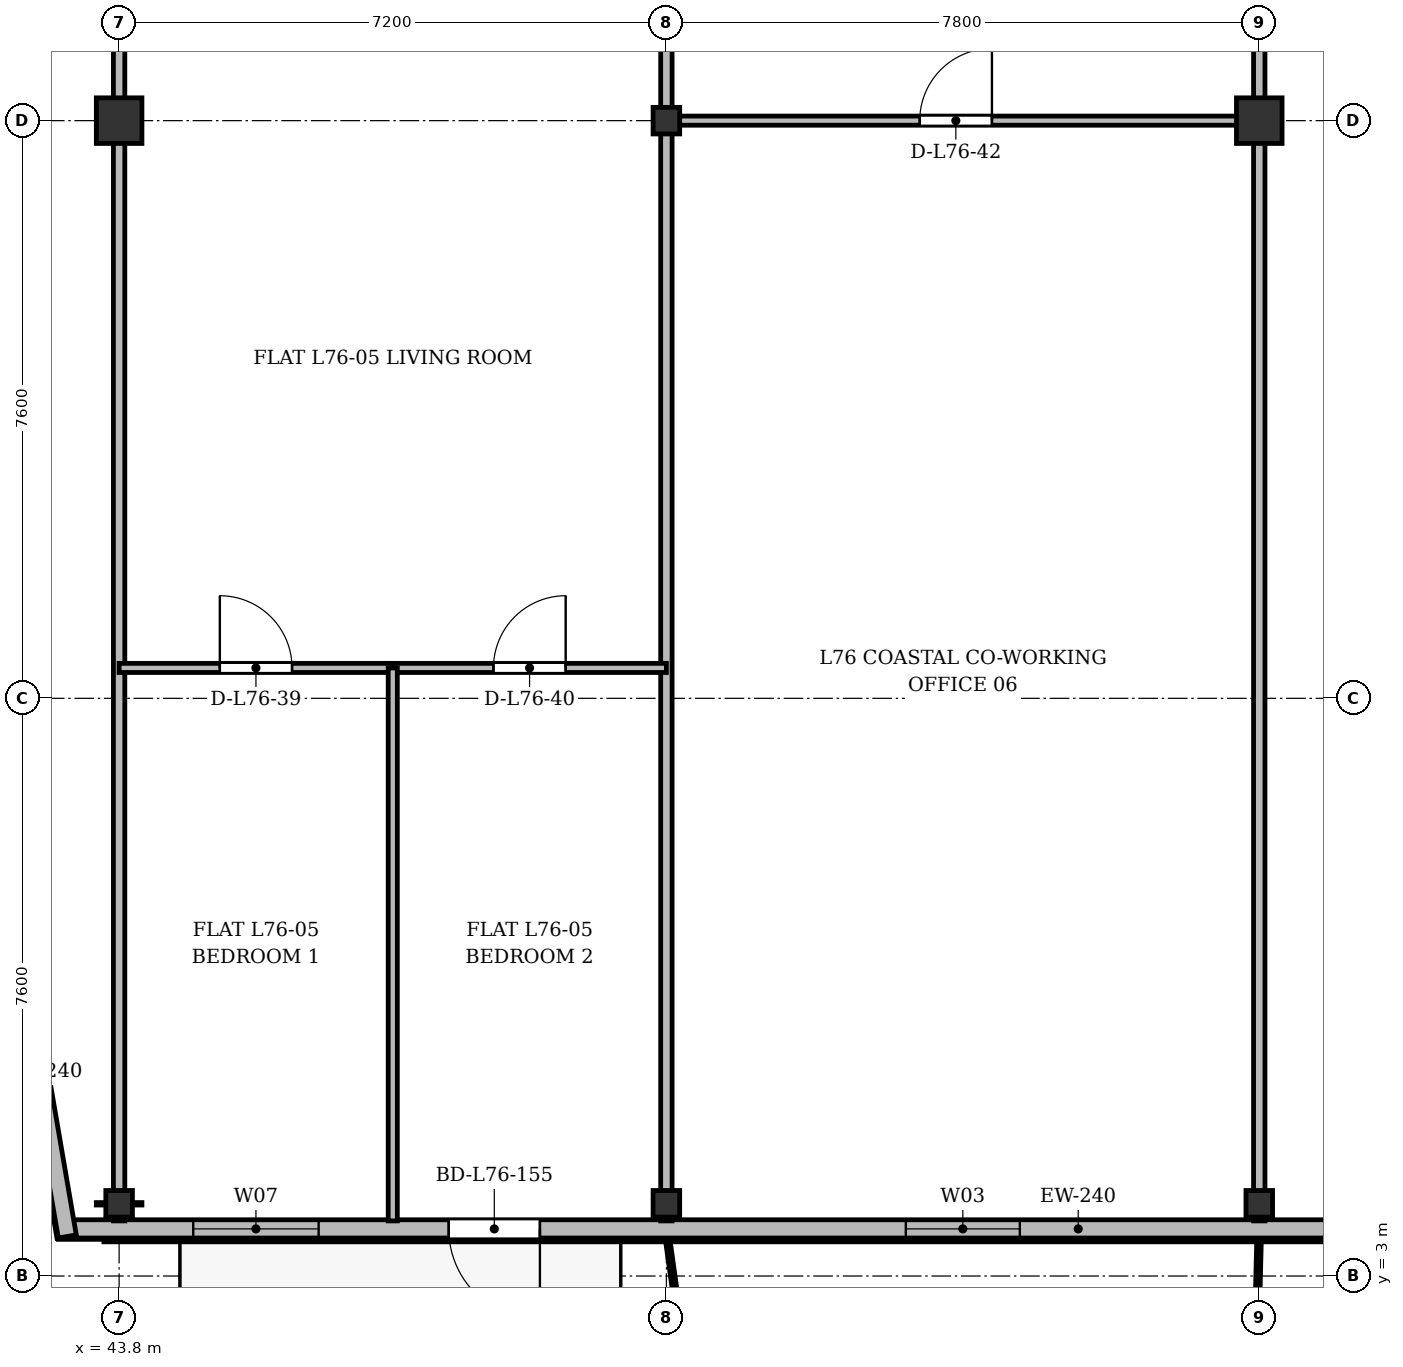
"""IFC4 building model, lengths in metres.
Left out: names, types, materials, properties, quantities, classifications, styles, units other than length and angle.
Written with IfcOpenShell. Run it as: python <this file> out.ifc"""

import sys

from ifc_helpers import new_model, si_unit, direction, frame, frame_2d, origin, origin_2d, place, context, subcontext, project, spatial, rectangle, i_section, extrude, source, transform, mapped, element, fill, save


model = new_model("IFC4")
c1 = context("Model", 3, precision=1e-05, world=origin(), true_north=direction((0.0, 1.0)))
c2 = subcontext(c1, "Body", "Model", "MODEL_VIEW")
j1 = project(units=[si_unit("LENGTHUNIT", "METRE"), si_unit("PLANEANGLEUNIT", "RADIAN")], contexts=[c1])
p1 = place(None, origin())
s1 = spatial("IfcSite", under=j1, at=p1, CompositionType="ELEMENT")
p2 = place(p1, origin())
s2 = spatial("IfcBuilding", under=s1, at=p2, CompositionType="ELEMENT")
p3 = place(p2, frame((0.0, 0.0, 291.9)))
s3 = spatial("IfcBuildingStorey", under=s2, at=p3, CompositionType="ELEMENT", Elevation=291.9)
m1 = source(origin(), c2, "Body", "SweptSolid", [
    extrude(i_section(OverallWidth=0.35, OverallDepth=0.35, WebThickness=0.018, FlangeThickness=0.028, at=origin_2d()), origin(), (0.0, 0.0, 1.0), 3.6),
])
p4 = place(p3, frame((43.8, 3.95, 0.0), z_axis=(0.0, 0.0, 1.0), x_axis=(1.0, 0.0, 0.0)))
e1 = element("IfcColumn", 1, at=p4, inside=s3, PredefinedType="COLUMN", context=c2, shape_type="MappedRepresentation", body=[
    mapped(m1, transform((0.0, 0.0, 0.0), x_axis=(1.0, 0.0, 0.0), y_axis=(0.0, 1.0, 0.0), z_axis=(0.0, 0.0, 1.0), scale=1.0)),
])
m2 = source(origin(), c2, "Body", "SweptSolid", [
    extrude(rectangle(XDim=0.6, YDim=0.6, at=origin_2d()), origin(), (0.0, 0.0, 1.0), 3.6),
])
p5 = place(p3, frame((43.8, 18.2, 0.0), z_axis=(0.0, 0.0, 1.0), x_axis=(1.0, 0.0, 0.0)))
e2 = element("IfcColumn", 2, at=p5, inside=s3, PredefinedType="COLUMN", context=c2, shape_type="MappedRepresentation", body=[
    mapped(m2, transform((0.0, 0.0, 0.0), x_axis=(1.0, 0.0, 0.0), y_axis=(0.0, 1.0, 0.0), z_axis=(0.0, 0.0, 1.0), scale=1.0)),
])
for number, where, z_axis, x_axis in (
    (3, (51.0, 3.95, 0.0), (0.0, 0.0, 1.0), (1.0, 0.0, 0.0)),
    (4, (51.0, 18.2, 0.0), (0.0, 0.0, 1.0), (1.0, 0.0, 0.0)),
    (5, (58.8, 3.95, 0.0), (0.0, 0.0, 1.0), (1.0, 0.0, 0.0)),
):
    element("IfcColumn", number, at=place(p3, frame(where, z_axis=z_axis, x_axis=x_axis)), inside=s3, PredefinedType="COLUMN", context=c2, shape_type="MappedRepresentation", body=[
        mapped(m1, transform((0.0, 0.0, 0.0), x_axis=(1.0, 0.0, 0.0), y_axis=(0.0, 1.0, 0.0), z_axis=(0.0, 0.0, 1.0), scale=1.0)),
    ])
p6 = place(p3, frame((58.8, 18.2, 0.0), z_axis=(0.0, 0.0, 1.0), x_axis=(1.0, 0.0, 0.0)))
e6 = element("IfcColumn", 6, at=p6, inside=s3, PredefinedType="COLUMN", context=c2, shape_type="MappedRepresentation", body=[
    mapped(m2, transform((0.0, 0.0, 0.0), x_axis=(1.0, 0.0, 0.0), y_axis=(0.0, 1.0, 0.0), z_axis=(0.0, 0.0, 1.0), scale=1.0)),
])
p7 = place(p3, frame((63.2, 3.62, 0.0), z_axis=(0.0, 0.0, 1.0), x_axis=(-1.0, 0.0, 0.0)))
e7 = element("IfcWall", 7, at=p7, inside=s3, PredefinedType="SOLIDWALL", context=c2, shape_type="SweptSolid", body=[
    extrude(rectangle(XDim=20.2, YDim=0.24, at=frame_2d((10.1, 0.0))), origin(), (0.0, 0.0, 1.0), 3.18),
])
p8 = place(p7, frame((1.145, 0.0, 0.9)))
e8 = element("IfcOpeningElement", 8, at=p8, cuts=e7, PredefinedType="OPENING", context=c2, shape_type="SweptSolid", body=[
    extrude(rectangle(XDim=2.2, YDim=1.8, at=frame_2d((1.1, 0.9))), frame((0.0, 0.13, 0.0), z_axis=(0.0, -1.0, 0.0), x_axis=(1.0, 0.0, 0.0)), (0.0, 0.0, 1.0), 0.26),
])
p9 = place(p7, frame((7.55, 0.0, 0.9)))
e9 = element("IfcOpeningElement", 9, at=p9, cuts=e7, PredefinedType="OPENING", context=c2, shape_type="SweptSolid", body=[
    extrude(rectangle(XDim=1.5, YDim=1.75, at=frame_2d((0.75, 0.875))), frame((0.0, 0.13, 0.0), z_axis=(0.0, -1.0, 0.0), x_axis=(1.0, 0.0, 0.0)), (0.0, 0.0, 1.0), 0.26),
])
p10 = place(p7, frame((13.864, 0.0, 0.0)))
e10 = element("IfcOpeningElement", 10, at=p10, cuts=e7, PredefinedType="OPENING", context=c2, shape_type="SweptSolid", body=[
    extrude(rectangle(XDim=1.2, YDim=2.2, at=frame_2d((0.6, 1.1))), frame((0.0, 0.13, 0.0), z_axis=(0.0, -1.0, 0.0), x_axis=(1.0, 0.0, 0.0)), (0.0, 0.0, 1.0), 0.26),
])
p11 = place(p7, frame((16.775, 0.0, 0.9)))
e11 = element("IfcOpeningElement", 11, at=p11, cuts=e7, PredefinedType="OPENING", context=c2, shape_type="SweptSolid", body=[
    extrude(rectangle(XDim=1.65, YDim=1.85, at=frame_2d((0.825, 0.925))), frame((0.0, 0.13, 0.0), z_axis=(0.0, -1.0, 0.0), x_axis=(1.0, 0.0, 0.0)), (0.0, 0.0, 1.0), 0.26),
])
p12 = place(p3, frame((43.118, 3.52, 0.0), z_axis=(0.0, 0.0, 1.0), x_axis=(-0.168990530437, 0.98561767467, 0.0)))
e12 = element("IfcWall", 12, at=p12, inside=s3, PredefinedType="SOLIDWALL", context=c2, shape_type="SweptSolid", body=[
    extrude(rectangle(XDim=3.551, YDim=0.24, at=frame_2d((1.775, 0.0))), origin(), (0.0, 0.0, 1.0), 2.73),
])
for number, where, z_axis, x_axis in (
    (13, (43.8, 3.725, 0.0), (0.0, 0.0, 1.0), (0.0, 1.0, 0.0)),
    (14, (51.0, 3.725, 0.0), (0.0, 0.0, 1.0), (0.0, 1.0, 0.0)),
):
    element("IfcWall", number, at=place(p3, frame(where, z_axis=z_axis, x_axis=x_axis)), inside=s3, PredefinedType="PARTITIONING", context=c2, shape_type="SweptSolid", body=[
        extrude(rectangle(XDim=27.275, YDim=0.15, at=frame_2d((13.637, 0.0))), origin(), (0.0, 0.0, 1.0), 2.68),
    ])
p13 = place(p3, frame((58.8, 3.725, 0.0), z_axis=(0.0, 0.0, 1.0), x_axis=(0.0, 1.0, 0.0)))
e15 = element("IfcWall", 15, at=p13, inside=s3, PredefinedType="PARTITIONING", context=c2, shape_type="SweptSolid", body=[
    extrude(rectangle(XDim=27.275, YDim=0.15, at=frame_2d((13.637, 0.0))), origin(), (0.0, 0.0, 1.0), 2.53),
])
p14 = place(p3, frame((43.8, 11.0, 0.0), z_axis=(0.0, 0.0, 1.0), x_axis=(1.0, 0.0, 0.0)))
e16 = element("IfcWall", 16, at=p14, inside=s3, PredefinedType="PARTITIONING", context=c2, shape_type="SweptSolid", body=[
    extrude(rectangle(XDim=3.6, YDim=0.12, at=frame_2d((1.8, 0.0))), origin(), (0.0, 0.0, 1.0), 2.68),
])
p15 = place(p14, frame((1.325, 0.0, 0.0)))
e17 = element("IfcOpeningElement", 17, at=p15, cuts=e16, PredefinedType="OPENING", context=c2, shape_type="SweptSolid", body=[
    extrude(rectangle(XDim=0.95, YDim=2.15, at=frame_2d((0.475, 1.075))), frame((0.0, 0.07, 0.0), z_axis=(0.0, -1.0, 0.0), x_axis=(1.0, 0.0, 0.0)), (0.0, 0.0, 1.0), 0.14),
])
p16 = place(p3, frame((47.4, 11.0, 0.0), z_axis=(0.0, 0.0, 1.0), x_axis=(1.0, 0.0, 0.0)))
e18 = element("IfcWall", 18, at=p16, inside=s3, PredefinedType="PARTITIONING", context=c2, shape_type="SweptSolid", body=[
    extrude(rectangle(XDim=3.6, YDim=0.12, at=frame_2d((1.8, 0.0))), origin(), (0.0, 0.0, 1.0), 2.68),
])
p17 = place(p16, frame((1.325, 0.0, 0.0)))
e19 = element("IfcOpeningElement", 19, at=p17, cuts=e18, PredefinedType="OPENING", context=c2, shape_type="SweptSolid", body=[
    extrude(rectangle(XDim=0.95, YDim=2.15, at=frame_2d((0.475, 1.075))), frame((0.0, 0.07, 0.0), z_axis=(0.0, -1.0, 0.0), x_axis=(1.0, 0.0, 0.0)), (0.0, 0.0, 1.0), 0.14),
])
p18 = place(p3, frame((47.4, 3.725, 0.0), z_axis=(0.0, 0.0, 1.0), x_axis=(0.0, 1.0, 0.0)))
e20 = element("IfcWall", 20, at=p18, inside=s3, PredefinedType="PARTITIONING", context=c2, shape_type="SweptSolid", body=[
    extrude(rectangle(XDim=7.275, YDim=0.12, at=frame_2d((3.637, 0.0))), origin(), (0.0, 0.0, 1.0), 2.73),
])
p19 = place(p3, frame((51.0, 18.2, 0.0), z_axis=(0.0, 0.0, 1.0), x_axis=(1.0, 0.0, 0.0)))
e21 = element("IfcWall", 21, at=p19, inside=s3, PredefinedType="PARTITIONING", context=c2, shape_type="SweptSolid", body=[
    extrude(rectangle(XDim=7.8, YDim=0.12, at=frame_2d((3.9, 0.0))), origin(), (0.0, 0.0, 1.0), 2.73),
])
p20 = place(p19, frame((3.333, 0.0, 0.0)))
e22 = element("IfcOpeningElement", 22, at=p20, cuts=e21, PredefinedType="OPENING", context=c2, shape_type="SweptSolid", body=[
    extrude(rectangle(XDim=0.95, YDim=2.15, at=frame_2d((0.475, 1.075))), frame((0.0, 0.07, 0.0), z_axis=(0.0, -1.0, 0.0), x_axis=(1.0, 0.0, 0.0)), (0.0, 0.0, 1.0), 0.14),
])
m3 = source(origin(), c2, "Body", "SweptSolid", [
    extrude(rectangle(XDim=1.5, YDim=1.75, at=frame_2d((0.75, 0.875))), frame((0.0, 0.03, 0.0), z_axis=(0.0, -1.0, 0.0), x_axis=(1.0, 0.0, 0.0)), (0.0, 0.0, 1.0), 0.06),
])
p21 = place(p9, origin())
e23 = element("IfcWindow", 23, at=p21, inside=s3, PartitioningType="SINGLE_PANEL", PredefinedType="WINDOW", context=c2, shape_type="MappedRepresentation", body=[
    mapped(m3, transform((0.0, 0.0, 0.0), x_axis=(1.0, 0.0, 0.0), y_axis=(0.0, 1.0, 0.0), z_axis=(0.0, 0.0, 1.0), scale=1.0)),
])
fill(e9, e23)
m4 = source(origin(), c2, "Body", "SweptSolid", [
    extrude(rectangle(XDim=1.2, YDim=2.2, at=frame_2d((0.6, 1.1))), frame((0.0, 0.025, 0.0), z_axis=(0.0, -1.0, 0.0), x_axis=(1.0, 0.0, 0.0)), (0.0, 0.0, 1.0), 0.05),
])
p22 = place(p10, origin())
e24 = element("IfcDoor", 24, at=p22, inside=s3, OperationType="SINGLE_SWING_LEFT", PredefinedType="DOOR", context=c2, shape_type="MappedRepresentation", body=[
    mapped(m4, transform((0.0, 0.0, 0.0), x_axis=(1.0, 0.0, 0.0), y_axis=(0.0, 1.0, 0.0), z_axis=(0.0, 0.0, 1.0), scale=1.0)),
])
fill(e10, e24)
m5 = source(origin(), c2, "Body", "SweptSolid", [
    extrude(rectangle(XDim=1.65, YDim=1.85, at=frame_2d((0.825, 0.925))), frame((0.0, 0.03, 0.0), z_axis=(0.0, -1.0, 0.0), x_axis=(1.0, 0.0, 0.0)), (0.0, 0.0, 1.0), 0.06),
])
p23 = place(p11, origin())
e25 = element("IfcWindow", 25, at=p23, inside=s3, PartitioningType="SINGLE_PANEL", PredefinedType="WINDOW", context=c2, shape_type="MappedRepresentation", body=[
    mapped(m5, transform((0.0, 0.0, 0.0), x_axis=(1.0, 0.0, 0.0), y_axis=(0.0, 1.0, 0.0), z_axis=(0.0, 0.0, 1.0), scale=1.0)),
])
fill(e11, e25)
m6 = source(origin(), c2, "Body", "SweptSolid", [
    extrude(rectangle(XDim=0.95, YDim=2.15, at=frame_2d((0.475, 1.075))), frame((0.0, 0.025, 0.0), z_axis=(0.0, -1.0, 0.0), x_axis=(1.0, 0.0, 0.0)), (0.0, 0.0, 1.0), 0.05),
])
p24 = place(p15, origin())
e26 = element("IfcDoor", 26, at=p24, inside=s3, OperationType="SINGLE_SWING_LEFT", PredefinedType="DOOR", context=c2, shape_type="MappedRepresentation", body=[
    mapped(m6, transform((0.0, 0.0, 0.0), x_axis=(1.0, 0.0, 0.0), y_axis=(0.0, 1.0, 0.0), z_axis=(0.0, 0.0, 1.0), scale=1.0)),
])
fill(e17, e26)
p25 = place(p17, origin())
e27 = element("IfcDoor", 27, at=p25, inside=s3, OperationType="SINGLE_SWING_RIGHT", PredefinedType="DOOR", context=c2, shape_type="MappedRepresentation", body=[
    mapped(m6, transform((0.0, 0.0, 0.0), x_axis=(1.0, 0.0, 0.0), y_axis=(0.0, 1.0, 0.0), z_axis=(0.0, 0.0, 1.0), scale=1.0)),
])
fill(e19, e27)
p26 = place(p20, origin())
e28 = element("IfcDoor", 28, at=p26, inside=s3, OperationType="SINGLE_SWING_RIGHT", PredefinedType="DOOR", context=c2, shape_type="MappedRepresentation", body=[
    mapped(m6, transform((0.0, 0.0, 0.0), x_axis=(1.0, 0.0, 0.0), y_axis=(0.0, 1.0, 0.0), z_axis=(0.0, 0.0, 1.0), scale=1.0)),
])
fill(e22, e28)
save(model, sys.argv[1])
